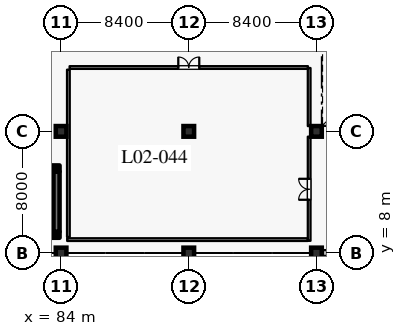
"""IFC4 building model, lengths in metres.
Left out: names, types, materials, properties, quantities, classifications, styles, units other than length and angle.
Written with IfcOpenShell. Run it as: python <this file> out.ifc"""

import sys

from ifc_helpers import new_model, si_unit, direction, frame, frame_2d, origin, origin_2d, place, context, subcontext, project, spatial, rectangle, hollow_rectangle, extrude, element, fill, save


model = new_model("IFC4")
c1 = context("Model", 3, precision=1e-05, world=origin(), true_north=direction((0.0, 1.0)))
c2 = subcontext(c1, "Body", "Model", "MODEL_VIEW")
j1 = project(units=[si_unit("LENGTHUNIT", "METRE"), si_unit("PLANEANGLEUNIT", "RADIAN")], contexts=[c1])
p1 = place(None, origin())
s1 = spatial("IfcSite", under=j1, at=p1, CompositionType="ELEMENT")
p2 = place(p1, origin())
s2 = spatial("IfcBuilding", under=s1, at=p2, CompositionType="ELEMENT")
p3 = place(p2, frame((0.0, 0.0, 11.4)))
s3 = spatial("IfcBuildingStorey", under=s2, at=p3, CompositionType="ELEMENT", Elevation=11.4)
for number, where, z_axis, x_axis in (
    (1, (84.0, 8.0, 0.0), (0.0, 0.0, 1.0), (1.0, 0.0, 0.0)),
    (2, (84.0, 16.0, 0.0), (0.0, 0.0, 1.0), (1.0, 0.0, 0.0)),
    (3, (92.4, 8.0, 0.0), (0.0, 0.0, 1.0), (1.0, 0.0, 0.0)),
    (4, (92.4, 16.0, 0.0), (0.0, 0.0, 1.0), (1.0, 0.0, 0.0)),
    (5, (100.8, 8.0, 0.0), (0.0, 0.0, 1.0), (1.0, 0.0, 0.0)),
    (6, (100.8, 16.0, 0.0), (0.0, 0.0, 1.0), (1.0, 0.0, 0.0)),
):
    element("IfcColumn", number, at=place(p3, frame(where, z_axis=z_axis, x_axis=x_axis)), inside=s3, PredefinedType="COLUMN", context=c2, shape_type="SweptSolid", body=[
        extrude(rectangle(XDim=0.7, YDim=0.7, at=origin_2d()), origin(), (0.0, 0.0, 1.0), 4.8),
    ])
p4 = place(p3, frame((108.85, 8.0, 0.0), z_axis=(0.0, 0.0, 1.0), x_axis=(-1.0, 0.0, 0.0)))
e7 = element("IfcWall", 7, at=p4, inside=s3, PredefinedType="SOLIDWALL", context=c2, shape_type="SweptSolid", body=[
    extrude(rectangle(XDim=7.7, YDim=0.38, at=frame_2d((3.85, 0.0))), origin(), (0.0, 0.0, 1.0), 3.85),
])
p5 = place(p4, frame((2.6, 0.0, 0.95)))
e8 = element("IfcOpeningElement", 8, at=p5, cuts=e7, PredefinedType="OPENING", context=c2, shape_type="SweptSolid", body=[
    extrude(rectangle(XDim=2.5, YDim=1.65, at=frame_2d((1.25, 0.825))), frame((0.0, 0.2, 0.0), z_axis=(0.0, -1.0, 0.0), x_axis=(1.0, 0.0, 0.0)), (0.0, 0.0, 1.0), 0.4),
])
p6 = place(p3, frame((75.7, 9.2, 0.0), z_axis=(0.0, 0.0, 1.0), x_axis=(1.0, 0.0, 0.0)))
e9 = element("IfcWall", 9, at=p6, inside=s3, PredefinedType="SHEAR", context=c2, shape_type="SweptSolid", body=[
    extrude(rectangle(XDim=8.2, YDim=0.4, at=frame_2d((4.1, 0.0))), origin(), (0.0, 0.0, 1.0), 4.535),
])
p7 = place(p3, frame((83.7, 9.405, 0.0), z_axis=(0.0, 0.0, 1.0), x_axis=(0.0, 1.0, 0.0)))
e10 = element("IfcWall", 10, at=p7, inside=s3, PredefinedType="SHEAR", context=c2, shape_type="SweptSolid", body=[
    extrude(rectangle(XDim=3.95, YDim=0.4, at=frame_2d((1.975, 0.0))), origin(), (0.0, 0.0, 1.0), 4.535),
])
p8 = place(p3, frame((75.7, 13.56, 0.0), z_axis=(0.0, 0.0, 1.0), x_axis=(1.0, 0.0, 0.0)))
e11 = element("IfcWall", 11, at=p8, inside=s3, PredefinedType="SHEAR", context=c2, shape_type="SweptSolid", body=[
    extrude(rectangle(XDim=8.2, YDim=0.4, at=frame_2d((4.1, 0.0))), origin(), (0.0, 0.0, 1.0), 4.535),
])
p9 = place(p8, frame((0.62, 0.0, 0.0)))
e12 = element("IfcOpeningElement", 12, at=p9, cuts=e11, PredefinedType="OPENING", context=c2, shape_type="SweptSolid", body=[
    extrude(rectangle(XDim=1.16, YDim=2.2, at=frame_2d((0.58, 1.1))), frame((0.0, 0.21, 0.0), z_axis=(0.0, -1.0, 0.0), x_axis=(1.0, 0.0, 0.0)), (0.0, 0.0, 1.0), 0.42),
])
for number, where, z_axis, x_axis in (
    (13, (83.52, 9.2, -2.7), (0.0, 0.0, 1.0), (1.0, 0.0, 0.0)),
    (14, (83.52, 13.56, -2.7), (0.0, 0.0, 1.0), (1.0, 0.0, 0.0)),
):
    element("IfcColumn", number, at=place(p3, frame(where, z_axis=z_axis, x_axis=x_axis)), inside=s3, PredefinedType="COLUMN", context=c2, shape_type="SweptSolid", body=[
        extrude(hollow_rectangle(XDim=0.3, YDim=0.3, WallThickness=0.012, at=origin_2d()), origin(), (0.0, 0.0, 1.0), 4.92),
    ])
p10 = place(p3, frame((84.56, 20.2, 0.0), z_axis=(0.0, 0.0, 1.0), x_axis=(1.0, 0.0, 0.0)))
e15 = element("IfcWall", 15, at=p10, inside=s3, PredefinedType="PARTITIONING", context=c2, shape_type="SweptSolid", body=[
    extrude(rectangle(XDim=15.68, YDim=0.18, at=frame_2d((7.84, 0.0))), origin(), (0.0, 0.0, 1.0), 4.535),
])
p11 = place(p10, frame((7.15, 0.0, 0.0)))
e16 = element("IfcOpeningElement", 16, at=p11, cuts=e15, PredefinedType="OPENING", context=c2, shape_type="SweptSolid", body=[
    extrude(rectangle(XDim=1.38, YDim=2.3, at=frame_2d((0.69, 1.15))), frame((0.0, 0.1, 0.0), z_axis=(0.0, -1.0, 0.0), x_axis=(1.0, 0.0, 0.0)), (0.0, 0.0, 1.0), 0.2),
])
p12 = place(p3, frame((84.48, 9.05, 0.0), z_axis=(0.0, 0.0, 1.0), x_axis=(0.0, 1.0, 0.0)))
e17 = element("IfcWall", 17, at=p12, inside=s3, PredefinedType="PARTITIONING", context=c2, shape_type="SweptSolid", body=[
    extrude(rectangle(XDim=11.01, YDim=0.18, at=frame_2d((5.505, 0.0))), origin(), (0.0, 0.0, 1.0), 4.535),
])
p13 = place(p3, frame((100.32, 8.8, 0.0), z_axis=(0.0, 0.0, 1.0), x_axis=(0.0, 1.0, 0.0)))
e18 = element("IfcWall", 18, at=p13, inside=s3, PredefinedType="PARTITIONING", context=c2, shape_type="SweptSolid", body=[
    extrude(rectangle(XDim=6.855, YDim=0.18, at=frame_2d((3.427, 0.0))), origin(), (0.0, 0.0, 1.0), 4.535),
])
p14 = place(p13, frame((2.7, 0.0, 0.0)))
e19 = element("IfcOpeningElement", 19, at=p14, cuts=e18, PredefinedType="OPENING", context=c2, shape_type="SweptSolid", body=[
    extrude(rectangle(XDim=1.38, YDim=2.3, at=frame_2d((0.69, 1.15))), frame((0.0, 0.1, 0.0), z_axis=(0.0, -1.0, 0.0), x_axis=(1.0, 0.0, 0.0)), (0.0, 0.0, 1.0), 0.2),
])
p15 = place(p3, frame((100.32, 16.345, 0.0), z_axis=(0.0, 0.0, 1.0), x_axis=(0.0, 1.0, 0.0)))
e20 = element("IfcWall", 20, at=p15, inside=s3, PredefinedType="PARTITIONING", context=c2, shape_type="SweptSolid", body=[
    extrude(rectangle(XDim=3.823, YDim=0.18, at=frame_2d((1.912, 0.0))), origin(), (0.0, 0.0, 1.0), 4.535),
])
p16 = place(p3, frame((84.4, 8.88, 0.0), z_axis=(0.0, 0.0, 1.0), x_axis=(1.0, 0.0, 0.0)))
e21 = element("IfcWall", 21, at=p16, inside=s3, PredefinedType="PARTITIONING", context=c2, shape_type="SweptSolid", body=[
    extrude(rectangle(XDim=15.83, YDim=0.18, at=frame_2d((7.915, 0.0))), origin(), (0.0, 0.0, 1.0), 4.535),
])
p17 = place(p11, origin())
e22 = element("IfcDoor", 22, at=p17, inside=s3, OperationType="DOUBLE_DOOR_SINGLE_SWING", PredefinedType="DOOR", context=c2, shape_type="SweptSolid", body=[
    extrude(rectangle(XDim=1.38, YDim=2.3, at=frame_2d((0.69, 1.15))), frame((0.0, 0.025, 0.0), z_axis=(0.0, -1.0, 0.0), x_axis=(1.0, 0.0, 0.0)), (0.0, 0.0, 1.0), 0.05),
])
fill(e16, e22)
p18 = place(p14, origin())
e23 = element("IfcDoor", 23, at=p18, inside=s3, OperationType="DOUBLE_DOOR_SINGLE_SWING", PredefinedType="DOOR", context=c2, shape_type="SweptSolid", body=[
    extrude(rectangle(XDim=1.38, YDim=2.3, at=frame_2d((0.69, 1.15))), frame((0.0, 0.025, 0.0), z_axis=(0.0, -1.0, 0.0), x_axis=(1.0, 0.0, 0.0)), (0.0, 0.0, 1.0), 0.05),
])
fill(e19, e23)
save(model, sys.argv[1])
